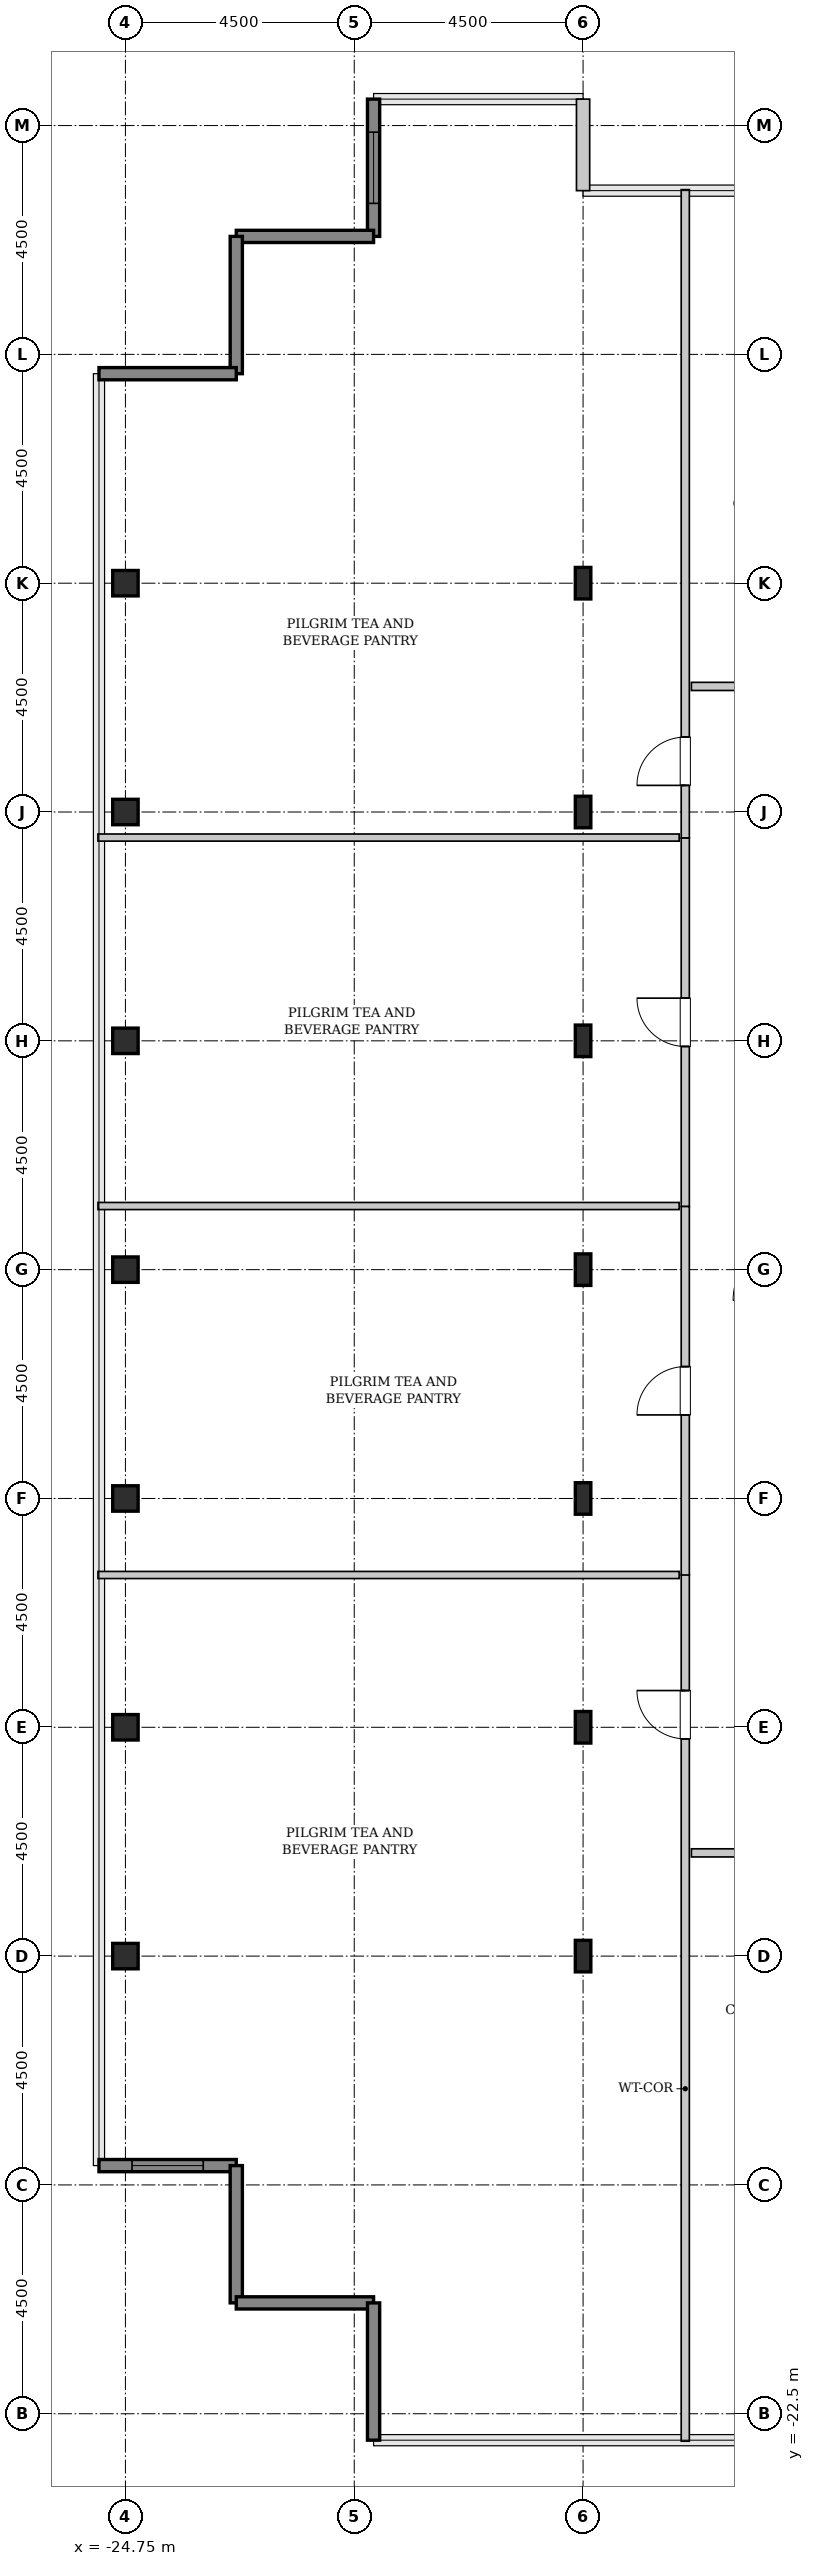
"""IFC4 building model, lengths in metres.
Left out: names, types, materials, properties, quantities, classifications, styles, units other than length and angle.
Written with IfcOpenShell. Run it as: python <this file> out.ifc"""

import sys

from ifc_helpers import new_model, si_unit, direction, frame, frame_2d, origin, origin_2d, place, context, subcontext, project, spatial, rectangle, hollow_rectangle, i_section, extrude, source, transform, mapped, element, fill, save


model = new_model("IFC4")
c1 = context("Model", 3, precision=1e-05, world=origin(), true_north=direction((0.0, 1.0)))
c2 = subcontext(c1, "Body", "Model", "MODEL_VIEW")
j1 = project(units=[si_unit("LENGTHUNIT", "METRE"), si_unit("PLANEANGLEUNIT", "RADIAN")], contexts=[c1])
p1 = place(None, origin())
s1 = spatial("IfcSite", under=j1, at=p1, CompositionType="ELEMENT")
p2 = place(p1, origin())
s2 = spatial("IfcBuilding", under=s1, at=p2, CompositionType="ELEMENT")
p3 = place(p2, frame((0.0, 0.0, 295.0)))
s3 = spatial("IfcBuildingStorey", under=s2, at=p3, CompositionType="ELEMENT", Elevation=295.0)
m1 = source(origin(), c2, "Body", "SweptSolid", [
    extrude(hollow_rectangle(XDim=0.5, YDim=0.5, WallThickness=0.025, InnerFilletRadius=0.025, OuterFilletRadius=0.05, at=origin_2d()), origin(), (0.0, 0.0, 1.0), 3.8),
])
for number, where, z_axis, x_axis in (
    (1, (-24.75, -13.5, 0.0), (0.0, 0.0, 1.0), (1.0, 0.0, 0.0)),
    (2, (-24.75, -9.0, 0.0), (0.0, 0.0, 1.0), (1.0, 0.0, 0.0)),
    (3, (-24.75, -4.5, 0.0), (0.0, 0.0, 1.0), (1.0, 0.0, 0.0)),
    (4, (-24.75, 0.0, 0.0), (0.0, 0.0, 1.0), (1.0, 0.0, 0.0)),
    (5, (-24.75, 4.5, 0.0), (0.0, 0.0, 1.0), (1.0, 0.0, 0.0)),
    (6, (-24.75, 9.0, 0.0), (0.0, 0.0, 1.0), (1.0, 0.0, 0.0)),
    (7, (-24.75, 13.5, 0.0), (0.0, 0.0, 1.0), (1.0, 0.0, 0.0)),
):
    element("IfcColumn", number, at=place(p3, frame(where, z_axis=z_axis, x_axis=x_axis)), inside=s3, PredefinedType="COLUMN", context=c2, shape_type="MappedRepresentation", body=[
        mapped(m1, transform((0.0, 0.0, 0.0), x_axis=(1.0, 0.0, 0.0), y_axis=(0.0, 1.0, 0.0), z_axis=(0.0, 0.0, 1.0), scale=1.0)),
    ])
m2 = source(origin(), c2, "Body", "SweptSolid", [
    extrude(i_section(OverallWidth=0.305, OverallDepth=0.62, WebThickness=0.021, FlangeThickness=0.04, FilletRadius=0.027, at=origin_2d()), origin(), (0.0, 0.0, 1.0), 3.8),
])
for number, where, z_axis, x_axis in (
    (8, (-15.75, -13.5, 0.0), (0.0, 0.0, 1.0), (1.0, 0.0, 0.0)),
    (9, (-15.75, -9.0, 0.0), (0.0, 0.0, 1.0), (1.0, 0.0, 0.0)),
    (10, (-15.75, -4.5, 0.0), (0.0, 0.0, 1.0), (1.0, 0.0, 0.0)),
    (11, (-15.75, 0.0, 0.0), (0.0, 0.0, 1.0), (1.0, 0.0, 0.0)),
    (12, (-15.75, 4.5, 0.0), (0.0, 0.0, 1.0), (1.0, 0.0, 0.0)),
    (13, (-15.75, 9.0, 0.0), (0.0, 0.0, 1.0), (1.0, 0.0, 0.0)),
    (14, (-15.75, 13.5, 0.0), (0.0, 0.0, 1.0), (1.0, 0.0, 0.0)),
):
    element("IfcColumn", number, at=place(p3, frame(where, z_axis=z_axis, x_axis=x_axis)), inside=s3, PredefinedType="COLUMN", context=c2, shape_type="MappedRepresentation", body=[
        mapped(m2, transform((0.0, 0.0, 0.0), x_axis=(1.0, 0.0, 0.0), y_axis=(0.0, 1.0, 0.0), z_axis=(0.0, 0.0, 1.0), scale=1.0)),
    ])
m3 = source(origin(), c2, "Body", "SweptSolid", [
    extrude(rectangle(XDim=1.8, YDim=0.26, at=frame_2d((0.9, 0.0))), origin(), (0.0, 0.0, 1.0), 3.55),
])
p4 = place(p3, frame((-15.75, 21.22, 0.0), z_axis=(0.0, 0.0, 1.0), x_axis=(0.0, 1.0, 0.0)))
e15 = element("IfcWall", 15, at=p4, inside=s3, PredefinedType="SOLIDWALL", context=c2, shape_type="MappedRepresentation", body=[
    mapped(m3, transform((0.0, 0.0, 0.0), x_axis=(1.0, 0.0, 0.0), y_axis=(0.0, 1.0, 0.0), z_axis=(0.0, 0.0, 1.0), scale=1.0)),
])
m4 = source(origin(), c2, "Body", "SweptSolid", [
    extrude(rectangle(XDim=2.7, YDim=0.24, at=frame_2d((1.35, 0.0))), origin(), (0.0, 0.0, 1.0), 3.55),
])
p5 = place(p3, frame((-19.87, 23.02, 0.0), z_axis=(0.0, 0.0, 1.0), x_axis=(0.0, -1.0, 0.0)))
e16 = element("IfcWall", 16, at=p5, inside=s3, PredefinedType="SHEAR", context=c2, shape_type="MappedRepresentation", body=[
    mapped(m4, transform((0.0, 0.0, 0.0), x_axis=(1.0, 0.0, 0.0), y_axis=(0.0, 1.0, 0.0), z_axis=(0.0, 0.0, 1.0), scale=1.0)),
])
p6 = place(p5, frame((0.65, 0.0, 0.85)))
e17 = element("IfcOpeningElement", 17, at=p6, cuts=e16, PredefinedType="OPENING", context=c2, shape_type="SweptSolid", body=[
    extrude(rectangle(XDim=1.4, YDim=1.8, at=frame_2d((0.7, 0.9))), frame((0.0, 0.13, 0.0), z_axis=(0.0, -1.0, 0.0), x_axis=(1.0, 0.0, 0.0)), (0.0, 0.0, 1.0), 0.26),
])
for number, where, z_axis, x_axis in (
    (18, (-19.87, 20.32, 0.0), (0.0, 0.0, 1.0), (-1.0, 0.0, 0.0)),
    (19, (-22.57, 20.32, 0.0), (0.0, 0.0, 1.0), (0.0, -1.0, 0.0)),
    (20, (-22.57, 17.62, 0.0), (0.0, 0.0, 1.0), (-1.0, 0.0, 0.0)),
):
    element("IfcWall", number, at=place(p3, frame(where, z_axis=z_axis, x_axis=x_axis)), inside=s3, PredefinedType="SHEAR", context=c2, shape_type="MappedRepresentation", body=[
        mapped(m4, transform((0.0, 0.0, 0.0), x_axis=(1.0, 0.0, 0.0), y_axis=(0.0, 1.0, 0.0), z_axis=(0.0, 0.0, 1.0), scale=1.0)),
    ])
p7 = place(p3, frame((-25.27, -17.62, 0.0), z_axis=(0.0, 0.0, 1.0), x_axis=(1.0, 0.0, 0.0)))
e21 = element("IfcWall", 21, at=p7, inside=s3, PredefinedType="SHEAR", context=c2, shape_type="MappedRepresentation", body=[
    mapped(m4, transform((0.0, 0.0, 0.0), x_axis=(1.0, 0.0, 0.0), y_axis=(0.0, 1.0, 0.0), z_axis=(0.0, 0.0, 1.0), scale=1.0)),
])
p8 = place(p7, frame((0.65, 0.0, 0.85)))
e22 = element("IfcOpeningElement", 22, at=p8, cuts=e21, PredefinedType="OPENING", context=c2, shape_type="SweptSolid", body=[
    extrude(rectangle(XDim=1.4, YDim=1.8, at=frame_2d((0.7, 0.9))), frame((0.0, 0.13, 0.0), z_axis=(0.0, -1.0, 0.0), x_axis=(1.0, 0.0, 0.0)), (0.0, 0.0, 1.0), 0.26),
])
for number, where, z_axis, x_axis in (
    (23, (-22.57, -17.62, 0.0), (0.0, 0.0, 1.0), (0.0, -1.0, 0.0)),
    (24, (-22.57, -20.32, 0.0), (0.0, 0.0, 1.0), (1.0, 0.0, 0.0)),
    (25, (-19.87, -20.32, 0.0), (0.0, 0.0, 1.0), (0.0, -1.0, 0.0)),
):
    element("IfcWall", number, at=place(p3, frame(where, z_axis=z_axis, x_axis=x_axis)), inside=s3, PredefinedType="SHEAR", context=c2, shape_type="MappedRepresentation", body=[
        mapped(m4, transform((0.0, 0.0, 0.0), x_axis=(1.0, 0.0, 0.0), y_axis=(0.0, 1.0, 0.0), z_axis=(0.0, 0.0, 1.0), scale=1.0)),
    ])
m5 = source(origin(), c2, "Body", "SweptSolid", [
    extrude(rectangle(XDim=17.045, YDim=0.16, at=frame_2d((8.522, 0.0))), origin(), (0.0, 0.0, 1.0), 3.535),
])
p9 = place(p3, frame((-13.74, -23.04, 0.0), z_axis=(0.0, 0.0, 1.0), x_axis=(0.0, 1.0, 0.0)))
e26 = element("IfcWall", 26, at=p9, inside=s3, PredefinedType="PARTITIONING", context=c2, shape_type="MappedRepresentation", body=[
    mapped(m5, transform((0.0, 0.0, 0.0), x_axis=(1.0, 0.0, 0.0), y_axis=(0.0, 1.0, 0.0), z_axis=(0.0, 0.0, 1.0), scale=1.0)),
])
p10 = place(p9, frame((13.812, 0.0, 0.0)))
e27 = element("IfcOpeningElement", 27, at=p10, cuts=e26, PredefinedType="OPENING", context=c2, shape_type="SweptSolid", body=[
    extrude(rectangle(XDim=0.95, YDim=2.1, at=frame_2d((0.475, 1.05))), frame((0.0, 0.09, 0.0), z_axis=(0.0, -1.0, 0.0), x_axis=(1.0, 0.0, 0.0)), (0.0, 0.0, 1.0), 0.18),
])
m6 = source(origin(), c2, "Body", "SweptSolid", [
    extrude(rectangle(XDim=11.43, YDim=0.14, at=frame_2d((5.715, 0.0))), origin(), (0.0, 0.0, 1.0), 3.535),
])
p11 = place(p3, frame((-25.29, -6.005, 0.0), z_axis=(0.0, 0.0, 1.0), x_axis=(1.0, 0.0, 0.0)))
e28 = element("IfcWall", 28, at=p11, inside=s3, PredefinedType="PARTITIONING", context=c2, shape_type="MappedRepresentation", body=[
    mapped(m6, transform((0.0, 0.0, 0.0), x_axis=(1.0, 0.0, 0.0), y_axis=(0.0, 1.0, 0.0), z_axis=(0.0, 0.0, 1.0), scale=1.0)),
])
m7 = source(origin(), c2, "Body", "SweptSolid", [
    extrude(rectangle(XDim=12.752, YDim=0.16, at=frame_2d((6.376, 0.0))), origin(), (0.0, 0.0, 1.0), 3.535),
])
p12 = place(p3, frame((-13.74, 8.488, 0.0), z_axis=(0.0, 0.0, 1.0), x_axis=(0.0, 1.0, 0.0)))
e29 = element("IfcWall", 29, at=p12, inside=s3, PredefinedType="PARTITIONING", context=c2, shape_type="MappedRepresentation", body=[
    mapped(m7, transform((0.0, 0.0, 0.0), x_axis=(1.0, 0.0, 0.0), y_axis=(0.0, 1.0, 0.0), z_axis=(0.0, 0.0, 1.0), scale=1.0)),
])
p13 = place(p12, frame((1.036, 0.0, 0.0)))
e30 = element("IfcOpeningElement", 30, at=p13, cuts=e29, PredefinedType="OPENING", context=c2, shape_type="SweptSolid", body=[
    extrude(rectangle(XDim=0.95, YDim=2.1, at=frame_2d((0.475, 1.05))), frame((0.0, 0.09, 0.0), z_axis=(0.0, -1.0, 0.0), x_axis=(1.0, 0.0, 0.0)), (0.0, 0.0, 1.0), 0.18),
])
m8 = source(origin(), c2, "Body", "SweptSolid", [
    extrude(rectangle(XDim=11.43, YDim=0.14, at=frame_2d((5.715, 0.0))), origin(), (0.0, 0.0, 1.0), 2.925),
])
p14 = place(p3, frame((-25.29, 8.498, 0.0), z_axis=(0.0, 0.0, 1.0), x_axis=(1.0, 0.0, 0.0)))
e31 = element("IfcWall", 31, at=p14, inside=s3, PredefinedType="PARTITIONING", context=c2, shape_type="MappedRepresentation", body=[
    mapped(m8, transform((0.0, 0.0, 0.0), x_axis=(1.0, 0.0, 0.0), y_axis=(0.0, 1.0, 0.0), z_axis=(0.0, 0.0, 1.0), scale=1.0)),
])
m9 = source(origin(), c2, "Body", "SweptSolid", [
    extrude(rectangle(XDim=7.246, YDim=0.16, at=frame_2d((3.623, 0.0))), origin(), (0.0, 0.0, 1.0), 3.535),
])
p15 = place(p3, frame((-13.74, 1.241, 0.0), z_axis=(0.0, 0.0, 1.0), x_axis=(0.0, 1.0, 0.0)))
e32 = element("IfcWall", 32, at=p15, inside=s3, PredefinedType="PARTITIONING", context=c2, shape_type="MappedRepresentation", body=[
    mapped(m9, transform((0.0, 0.0, 0.0), x_axis=(1.0, 0.0, 0.0), y_axis=(0.0, 1.0, 0.0), z_axis=(0.0, 0.0, 1.0), scale=1.0)),
])
p16 = place(p15, frame((3.148, 0.0, 0.0)))
e33 = element("IfcOpeningElement", 33, at=p16, cuts=e32, PredefinedType="OPENING", context=c2, shape_type="SweptSolid", body=[
    extrude(rectangle(XDim=0.95, YDim=2.1, at=frame_2d((0.475, 1.05))), frame((0.0, 0.09, 0.0), z_axis=(0.0, -1.0, 0.0), x_axis=(1.0, 0.0, 0.0)), (0.0, 0.0, 1.0), 0.18),
])
p17 = place(p3, frame((-25.29, 1.251, 0.0), z_axis=(0.0, 0.0, 1.0), x_axis=(1.0, 0.0, 0.0)))
e34 = element("IfcWall", 34, at=p17, inside=s3, PredefinedType="PARTITIONING", context=c2, shape_type="MappedRepresentation", body=[
    mapped(m6, transform((0.0, 0.0, 0.0), x_axis=(1.0, 0.0, 0.0), y_axis=(0.0, 1.0, 0.0), z_axis=(0.0, 0.0, 1.0), scale=1.0)),
])
m10 = source(origin(), c2, "Body", "SweptSolid", [
    extrude(rectangle(XDim=7.246, YDim=0.16, at=frame_2d((3.623, 0.0))), origin(), (0.0, 0.0, 1.0), 3.535),
])
p18 = place(p3, frame((-13.74, -6.005, 0.0), z_axis=(0.0, 0.0, 1.0), x_axis=(0.0, 1.0, 0.0)))
e35 = element("IfcWall", 35, at=p18, inside=s3, PredefinedType="PARTITIONING", context=c2, shape_type="MappedRepresentation", body=[
    mapped(m10, transform((0.0, 0.0, 0.0), x_axis=(1.0, 0.0, 0.0), y_axis=(0.0, 1.0, 0.0), z_axis=(0.0, 0.0, 1.0), scale=1.0)),
])
p19 = place(p18, frame((3.148, 0.0, 0.0)))
e36 = element("IfcOpeningElement", 36, at=p19, cuts=e35, PredefinedType="OPENING", context=c2, shape_type="SweptSolid", body=[
    extrude(rectangle(XDim=0.95, YDim=2.1, at=frame_2d((0.475, 1.05))), frame((0.0, 0.09, 0.0), z_axis=(0.0, -1.0, 0.0), x_axis=(1.0, 0.0, 0.0)), (0.0, 0.0, 1.0), 0.18),
])
m11 = source(origin(), c2, "Body", "SweptSolid", [
    extrude(rectangle(XDim=4.125, YDim=0.16, at=frame_2d((2.062, 0.0))), origin(), (0.0, 0.0, 1.0), 3.535),
])
p20 = place(p3, frame((-13.62, 11.47, 0.0), z_axis=(0.0, 0.0, 1.0), x_axis=(1.0, 0.0, 0.0)))
e37 = element("IfcWall", 37, at=p20, inside=s3, PredefinedType="PARTITIONING", context=c2, shape_type="MappedRepresentation", body=[
    mapped(m11, transform((0.0, 0.0, 0.0), x_axis=(1.0, 0.0, 0.0), y_axis=(0.0, 1.0, 0.0), z_axis=(0.0, 0.0, 1.0), scale=1.0)),
])
p21 = place(p20, frame((1.587, 0.0, 0.0)))
e38 = element("IfcOpeningElement", 38, at=p21, cuts=e37, PredefinedType="OPENING", context=c2, shape_type="SweptSolid", body=[
    extrude(rectangle(XDim=0.95, YDim=2.1, at=frame_2d((0.475, 1.05))), frame((0.0, 0.09, 0.0), z_axis=(0.0, -1.0, 0.0), x_axis=(1.0, 0.0, 0.0)), (0.0, 0.0, 1.0), 0.18),
])
m12 = source(origin(), c2, "Body", "SweptSolid", [
    extrude(rectangle(XDim=3.825, YDim=0.16, at=frame_2d((1.913, 0.0))), origin(), (0.0, 0.0, 1.0), 3.535),
])
p22 = place(p3, frame((-13.62, -11.47, 0.0), z_axis=(0.0, 0.0, 1.0), x_axis=(1.0, 0.0, 0.0)))
e39 = element("IfcWall", 39, at=p22, inside=s3, PredefinedType="PARTITIONING", context=c2, shape_type="MappedRepresentation", body=[
    mapped(m12, transform((0.0, 0.0, 0.0), x_axis=(1.0, 0.0, 0.0), y_axis=(0.0, 1.0, 0.0), z_axis=(0.0, 0.0, 1.0), scale=1.0)),
])
p23 = place(p22, frame((1.438, 0.0, 0.0)))
e40 = element("IfcOpeningElement", 40, at=p23, cuts=e39, PredefinedType="OPENING", context=c2, shape_type="SweptSolid", body=[
    extrude(rectangle(XDim=0.95, YDim=2.1, at=frame_2d((0.475, 1.05))), frame((0.0, 0.09, 0.0), z_axis=(0.0, -1.0, 0.0), x_axis=(1.0, 0.0, 0.0)), (0.0, 0.0, 1.0), 0.18),
])
m13 = source(origin(), c2, "Body", "SweptSolid", [
    extrude(rectangle(XDim=1.4, YDim=1.8, at=frame_2d((0.7, 0.9))), frame((0.0, 0.03, 0.0), z_axis=(0.0, -1.0, 0.0), x_axis=(1.0, 0.0, 0.0)), (0.0, 0.0, 1.0), 0.06),
])
p24 = place(p6, origin())
e41 = element("IfcWindow", 41, at=p24, inside=s3, PartitioningType="SINGLE_PANEL", PredefinedType="WINDOW", context=c2, shape_type="MappedRepresentation", body=[
    mapped(m13, transform((0.0, 0.0, 0.0), x_axis=(1.0, 0.0, 0.0), y_axis=(0.0, 1.0, 0.0), z_axis=(0.0, 0.0, 1.0), scale=1.0)),
])
fill(e17, e41)
p25 = place(p8, origin())
e42 = element("IfcWindow", 42, at=p25, inside=s3, PartitioningType="SINGLE_PANEL", PredefinedType="WINDOW", context=c2, shape_type="MappedRepresentation", body=[
    mapped(m13, transform((0.0, 0.0, 0.0), x_axis=(1.0, 0.0, 0.0), y_axis=(0.0, 1.0, 0.0), z_axis=(0.0, 0.0, 1.0), scale=1.0)),
])
fill(e22, e42)
m14 = source(origin(), c2, "Body", "SweptSolid", [
    extrude(rectangle(XDim=0.95, YDim=2.1, at=frame_2d((0.475, 1.05))), frame((0.0, 0.025, 0.0), z_axis=(0.0, -1.0, 0.0), x_axis=(1.0, 0.0, 0.0)), (0.0, 0.0, 1.0), 0.05),
])
p26 = place(p10, origin())
e43 = element("IfcDoor", 43, at=p26, inside=s3, OperationType="SINGLE_SWING_RIGHT", PredefinedType="DOOR", context=c2, shape_type="MappedRepresentation", body=[
    mapped(m14, transform((0.0, 0.0, 0.0), x_axis=(1.0, 0.0, 0.0), y_axis=(0.0, 1.0, 0.0), z_axis=(0.0, 0.0, 1.0), scale=1.0)),
])
fill(e27, e43)
p27 = place(p13, origin())
e44 = element("IfcDoor", 44, at=p27, inside=s3, OperationType="SINGLE_SWING_LEFT", PredefinedType="DOOR", context=c2, shape_type="MappedRepresentation", body=[
    mapped(m14, transform((0.0, 0.0, 0.0), x_axis=(1.0, 0.0, 0.0), y_axis=(0.0, 1.0, 0.0), z_axis=(0.0, 0.0, 1.0), scale=1.0)),
])
fill(e30, e44)
p28 = place(p16, origin())
e45 = element("IfcDoor", 45, at=p28, inside=s3, OperationType="SINGLE_SWING_RIGHT", PredefinedType="DOOR", context=c2, shape_type="MappedRepresentation", body=[
    mapped(m14, transform((0.0, 0.0, 0.0), x_axis=(1.0, 0.0, 0.0), y_axis=(0.0, 1.0, 0.0), z_axis=(0.0, 0.0, 1.0), scale=1.0)),
])
fill(e33, e45)
p29 = place(p19, origin())
e46 = element("IfcDoor", 46, at=p29, inside=s3, OperationType="SINGLE_SWING_LEFT", PredefinedType="DOOR", context=c2, shape_type="MappedRepresentation", body=[
    mapped(m14, transform((0.0, 0.0, 0.0), x_axis=(1.0, 0.0, 0.0), y_axis=(0.0, 1.0, 0.0), z_axis=(0.0, 0.0, 1.0), scale=1.0)),
])
fill(e36, e46)
save(model, sys.argv[1])
